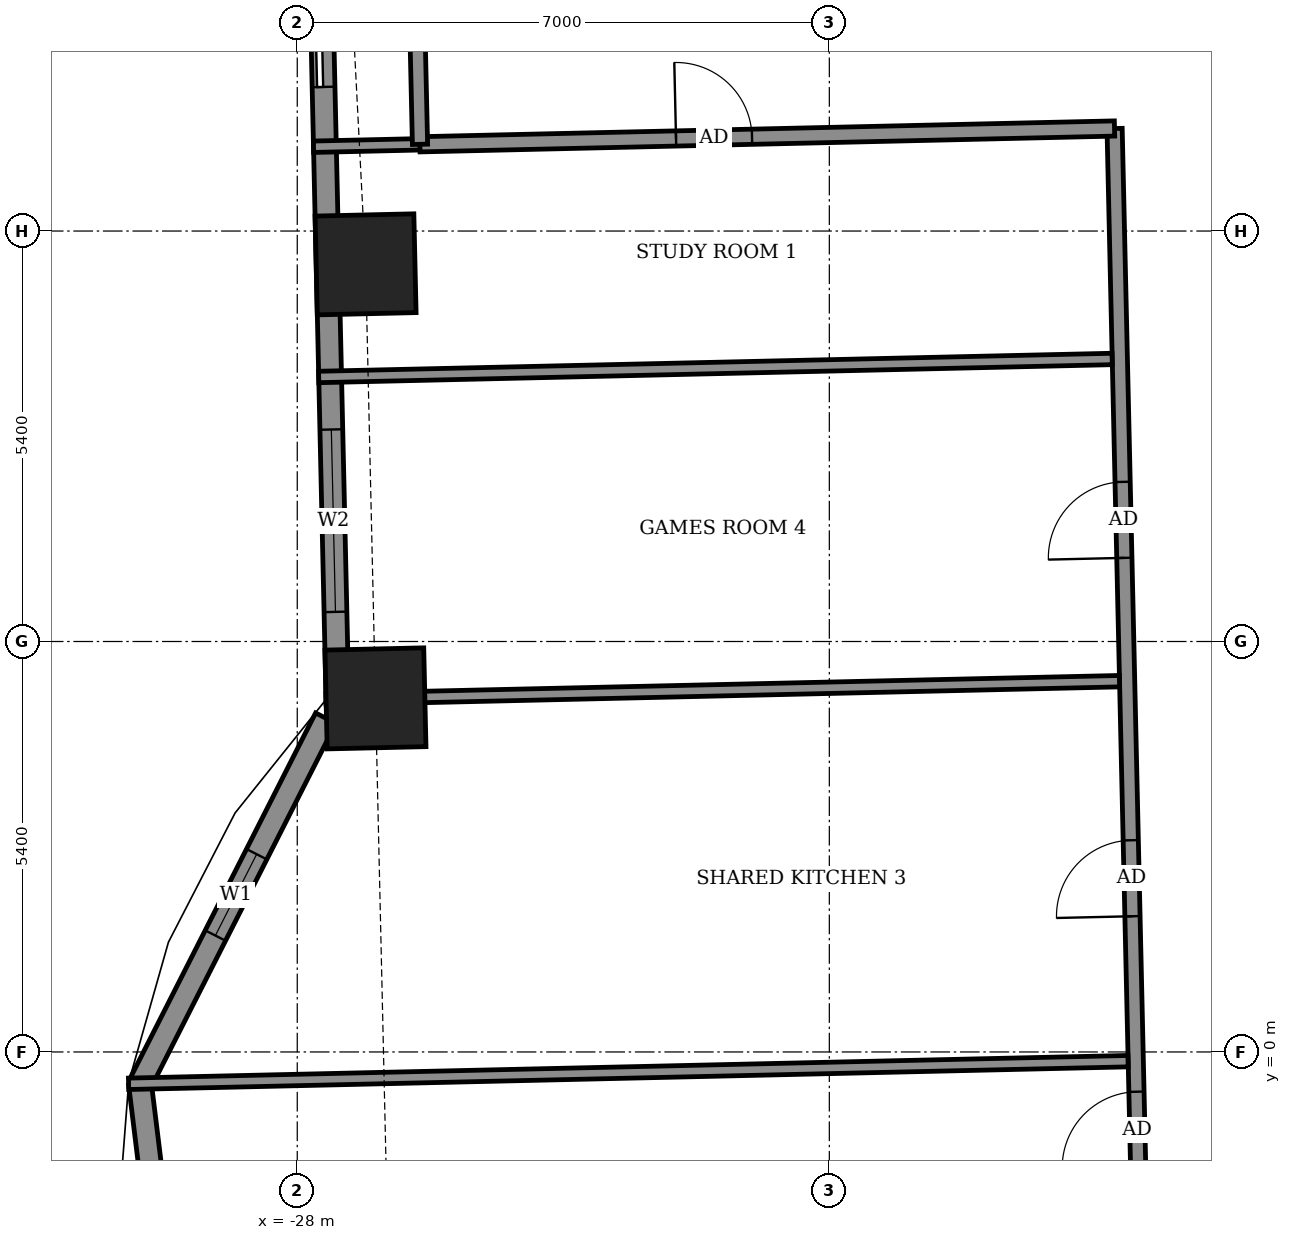
"""IFC4 building model, lengths in metres.
Left out: names, types, materials, properties, quantities, classifications, styles, units other than length and angle.
Written with IfcOpenShell. Run it as: python <this file> out.ifc"""

import sys

from ifc_helpers import new_model, si_unit, direction, frame, frame_2d, origin, origin_2d, place, context, subcontext, project, spatial, rectangle, extrude, element, fill, save


model = new_model("IFC4")
c1 = context("Model", 3, precision=1e-05, world=origin(), true_north=direction((0.0, 1.0)))
c2 = subcontext(c1, "Body", "Model", "MODEL_VIEW")
j1 = project(units=[si_unit("LENGTHUNIT", "METRE"), si_unit("PLANEANGLEUNIT", "RADIAN")], contexts=[c1])
p1 = place(None, origin())
s1 = spatial("IfcSite", under=j1, at=p1, CompositionType="ELEMENT")
p2 = place(p1, origin())
s2 = spatial("IfcBuilding", under=s1, at=p2, CompositionType="ELEMENT")
p3 = place(p2, frame((0.0, 0.0, 140.9)))
s3 = spatial("IfcBuildingStorey", under=s2, at=p3, CompositionType="ELEMENT", Elevation=140.9)
for number, where, z_axis, x_axis in (
    (1, (-27.101, 10.362, -0.55), (0.0, 0.0, 1.0), (0.023, -1.0, 0.0)),
    (2, (-26.971, 4.652, -0.55), (0.0, 0.0, 1.0), (0.023, -1.0, 0.0)),
):
    element("IfcColumn", number, at=place(p3, frame(where, z_axis=z_axis, x_axis=x_axis)), inside=s3, PredefinedType="COLUMN", context=c2, shape_type="SweptSolid", body=[
        extrude(rectangle(XDim=1.3, YDim=1.3, at=origin_2d()), origin(), (0.0, 0.0, 1.0), 3.6),
    ])
p4 = place(p3, frame((-27.727, 15.912, 0.0), z_axis=(0.0, 0.0, 1.0), x_axis=(0.022690078929, -0.999742547018, 0.0)))
e3 = element("IfcWall", 3, at=p4, inside=s3, PredefinedType="SOLIDWALL", context=c2, shape_type="SweptSolid", body=[
    extrude(rectangle(XDim=11.33, YDim=0.3, at=frame_2d((5.665, 0.0))), origin(), (0.0, 0.0, 1.0), 3.05),
])
p5 = place(p4, frame((1.717, 0.0, 0.0)))
e4 = element("IfcOpeningElement", 4, at=p5, cuts=e3, PredefinedType="OPENING", context=c2, shape_type="SweptSolid", body=[
    extrude(rectangle(XDim=1.5, YDim=2.4, at=frame_2d((0.75, 1.2))), frame((0.0, 0.16, 0.0), z_axis=(0.0, -1.0, 0.0), x_axis=(1.0, 0.0, 0.0)), (0.0, 0.0, 1.0), 0.32),
])
p6 = place(p4, frame((7.725, 0.0, 0.9)))
e5 = element("IfcOpeningElement", 5, at=p6, cuts=e3, PredefinedType="OPENING", context=c2, shape_type="SweptSolid", body=[
    extrude(rectangle(XDim=2.4, YDim=1.5, at=frame_2d((1.2, 0.75))), frame((0.0, 0.16, 0.0), z_axis=(0.0, -1.0, 0.0), x_axis=(1.0, 0.0, 0.0)), (0.0, 0.0, 1.0), 0.32),
])
p7 = place(p3, frame((-27.625, 4.392, 0.0), z_axis=(0.0, 0.0, 1.0), x_axis=(-0.45268572245, -0.891670138947, 0.0)))
e6 = element("IfcWall", 6, at=p7, inside=s3, PredefinedType="SOLIDWALL", context=c2, shape_type="SweptSolid", body=[
    extrude(rectangle(XDim=5.399, YDim=0.3, at=frame_2d((2.7, 0.0))), origin(), (0.0, 0.0, 1.0), 3.05),
])
p8 = place(p7, frame((2.008, 0.0, 0.9)))
e7 = element("IfcOpeningElement", 7, at=p8, cuts=e6, PredefinedType="OPENING", context=c2, shape_type="SweptSolid", body=[
    extrude(rectangle(XDim=1.2, YDim=1.5, at=frame_2d((0.6, 0.75))), frame((0.0, 0.16, 0.0), z_axis=(0.0, -1.0, 0.0), x_axis=(1.0, 0.0, 0.0)), (0.0, 0.0, 1.0), 0.32),
])
p9 = place(p3, frame((-30.069, -0.422, 0.0), z_axis=(0.0, 0.0, 1.0), x_axis=(0.122206978992, -0.992504636909, 0.0)))
e8 = element("IfcWall", 8, at=p9, inside=s3, PredefinedType="SOLIDWALL", context=c2, shape_type="SweptSolid", body=[
    extrude(rectangle(XDim=5.574, YDim=0.3, at=frame_2d((2.787, 0.0))), origin(), (0.0, 0.0, 1.0), 3.05),
])
p10 = place(p9, frame((2.187, 0.0, 0.9)))
e9 = element("IfcOpeningElement", 9, at=p10, cuts=e8, PredefinedType="OPENING", context=c2, shape_type="SweptSolid", body=[
    extrude(rectangle(XDim=1.2, YDim=1.5, at=frame_2d((0.6, 0.75))), frame((0.0, 0.16, 0.0), z_axis=(0.0, -1.0, 0.0), x_axis=(1.0, 0.0, 0.0)), (0.0, 0.0, 1.0), 0.32),
])
p11 = place(p3, frame((-30.307, 7.701, 0.0), z_axis=(0.0, 0.0, 1.0), x_axis=(-0.022706615587, 0.999742171567, 0.0)))
e10 = element("IfcWall", 10, at=p11, inside=s3, PredefinedType="USERDEFINED", context=c2, shape_type="SweptSolid", body=[
    extrude(rectangle(XDim=6.0, YDim=0.55, at=frame_2d((3.0, 0.0))), origin(), (0.0, 0.0, 1.0), 0.8),
])
p12 = place(p3, frame((-16.603, -16.218, 0.0), z_axis=(0.0, 0.0, 1.0), x_axis=(-0.022698146637, 0.999742363881, 0.0)))
e11 = element("IfcWall", 11, at=p12, inside=s3, PredefinedType="PARTITIONING", context=c2, shape_type="SweptSolid", body=[
    extrude(rectangle(XDim=28.374, YDim=0.2, at=frame_2d((14.187, 0.0))), origin(), (0.0, 0.0, 1.0), 3.05),
])
p13 = place(p12, frame((22.724, 0.0, 0.0)))
e12 = element("IfcOpeningElement", 12, at=p13, cuts=e11, PredefinedType="OPENING", context=c2, shape_type="SweptSolid", body=[
    extrude(rectangle(XDim=1.0, YDim=2.1, at=frame_2d((0.5, 1.05))), frame((0.0, 0.11, 0.0), z_axis=(0.0, -1.0, 0.0), x_axis=(1.0, 0.0, 0.0)), (0.0, 0.0, 1.0), 0.22),
])
p14 = place(p12, frame((18.008, 0.0, 0.0)))
e13 = element("IfcOpeningElement", 13, at=p14, cuts=e11, PredefinedType="OPENING", context=c2, shape_type="SweptSolid", body=[
    extrude(rectangle(XDim=1.0, YDim=2.1, at=frame_2d((0.5, 1.05))), frame((0.0, 0.11, 0.0), z_axis=(0.0, -1.0, 0.0), x_axis=(1.0, 0.0, 0.0)), (0.0, 0.0, 1.0), 0.22),
])
p15 = place(p12, frame((14.699, 0.0, 0.0)))
e14 = element("IfcOpeningElement", 14, at=p15, cuts=e11, PredefinedType="OPENING", context=c2, shape_type="SweptSolid", body=[
    extrude(rectangle(XDim=1.0, YDim=2.1, at=frame_2d((0.5, 1.05))), frame((0.0, 0.11, 0.0), z_axis=(0.0, -1.0, 0.0), x_axis=(1.0, 0.0, 0.0)), (0.0, 0.0, 1.0), 0.22),
])
p16 = place(p12, frame((12.549, 0.0, 0.0)))
e15 = element("IfcOpeningElement", 15, at=p16, cuts=e11, PredefinedType="OPENING", context=c2, shape_type="SweptSolid", body=[
    extrude(rectangle(XDim=0.9, YDim=2.1, at=frame_2d((0.45, 1.05))), frame((0.0, 0.11, 0.0), z_axis=(0.0, -1.0, 0.0), x_axis=(1.0, 0.0, 0.0)), (0.0, 0.0, 1.0), 0.22),
])
p17 = place(p12, frame((10.324, 0.0, 0.0)))
e16 = element("IfcOpeningElement", 16, at=p17, cuts=e11, PredefinedType="OPENING", context=c2, shape_type="SweptSolid", body=[
    extrude(rectangle(XDim=1.0, YDim=2.1, at=frame_2d((0.5, 1.05))), frame((0.0, 0.11, 0.0), z_axis=(0.0, -1.0, 0.0), x_axis=(1.0, 0.0, 0.0)), (0.0, 0.0, 1.0), 0.22),
])
p18 = place(p12, frame((8.199, 0.0, 0.0)))
e17 = element("IfcOpeningElement", 17, at=p18, cuts=e11, PredefinedType="OPENING", context=c2, shape_type="SweptSolid", body=[
    extrude(rectangle(XDim=0.9, YDim=2.1, at=frame_2d((0.45, 1.05))), frame((0.0, 0.11, 0.0), z_axis=(0.0, -1.0, 0.0), x_axis=(1.0, 0.0, 0.0)), (0.0, 0.0, 1.0), 0.22),
])
p19 = place(p12, frame((5.874, 0.0, 0.0)))
e18 = element("IfcOpeningElement", 18, at=p19, cuts=e11, PredefinedType="OPENING", context=c2, shape_type="SweptSolid", body=[
    extrude(rectangle(XDim=1.0, YDim=2.1, at=frame_2d((0.5, 1.05))), frame((0.0, 0.11, 0.0), z_axis=(0.0, -1.0, 0.0), x_axis=(1.0, 0.0, 0.0)), (0.0, 0.0, 1.0), 0.22),
])
p20 = place(p12, frame((3.75, 0.0, 0.0)))
e19 = element("IfcOpeningElement", 19, at=p20, cuts=e11, PredefinedType="OPENING", context=c2, shape_type="SweptSolid", body=[
    extrude(rectangle(XDim=0.9, YDim=2.1, at=frame_2d((0.45, 1.05))), frame((0.0, 0.11, 0.0), z_axis=(0.0, -1.0, 0.0), x_axis=(1.0, 0.0, 0.0)), (0.0, 0.0, 1.0), 0.22),
])
p21 = place(p3, frame((-30.219, -0.419, 0.0), z_axis=(0.0, 0.0, 1.0), x_axis=(0.99974353853, 0.022646349976, 0.0)))
e20 = element("IfcWall", 20, at=p21, inside=s3, PredefinedType="PARTITIONING", context=c2, shape_type="SweptSolid", body=[
    extrude(rectangle(XDim=13.152, YDim=0.15, at=frame_2d((6.576, 0.0))), origin(), (0.0, 0.0, 1.0), 2.1),
])
p22 = place(p3, frame((-27.621, 4.641, 0.0), z_axis=(0.0, 0.0, 1.0), x_axis=(0.999742728106, 0.022682098664, 0.0)))
e21 = element("IfcWall", 21, at=p22, inside=s3, PredefinedType="PARTITIONING", context=c2, shape_type="SweptSolid", body=[
    extrude(rectangle(XDim=10.441, YDim=0.15, at=frame_2d((5.22, 0.0))), origin(), (0.0, 0.0, 1.0), 3.05),
])
p23 = place(p3, frame((-27.718, 8.88, 0.0), z_axis=(0.0, 0.0, 1.0), x_axis=(0.999742245794, 0.022703347225, 0.0)))
e22 = element("IfcWall", 22, at=p23, inside=s3, PredefinedType="PARTITIONING", context=c2, shape_type="SweptSolid", body=[
    extrude(rectangle(XDim=10.442, YDim=0.15, at=frame_2d((5.221, 0.0))), origin(), (0.0, 0.0, 1.0), 2.55),
])
p24 = place(p3, frame((-27.786, 11.909, 0.0), z_axis=(0.0, 0.0, 1.0), x_axis=(0.999740216184, 0.022792545827, 0.0)))
e23 = element("IfcWall", 23, at=p24, inside=s3, PredefinedType="PARTITIONING", context=c2, shape_type="SweptSolid", body=[
    extrude(rectangle(XDim=1.403, YDim=0.15, at=frame_2d((0.702, 0.0))), origin(), (0.0, 0.0, 1.0), 2.55),
])
p25 = place(p3, frame((-26.387, 11.941, 0.0), z_axis=(0.0, 0.0, 1.0), x_axis=(0.999741076645, 0.022754772455, 0.0)))
e24 = element("IfcWall", 24, at=p25, inside=s3, PredefinedType="PARTITIONING", context=c2, shape_type="SweptSolid", body=[
    extrude(rectangle(XDim=9.141, YDim=0.2, at=frame_2d((4.571, 0.0))), origin(), (0.0, 0.0, 1.0), 3.05),
])
p26 = place(p25, frame((3.371, 0.0, 0.0)))
e25 = element("IfcOpeningElement", 25, at=p26, cuts=e24, PredefinedType="OPENING", context=c2, shape_type="SweptSolid", body=[
    extrude(rectangle(XDim=1.0, YDim=2.1, at=frame_2d((0.5, 1.05))), frame((0.0, 0.11, 0.0), z_axis=(0.0, -1.0, 0.0), x_axis=(1.0, 0.0, 0.0)), (0.0, 0.0, 1.0), 0.22),
])
p27 = place(p3, frame((-26.385, 11.941, 0.0), z_axis=(0.0, 0.0, 1.0), x_axis=(-0.022617910375, 0.999744182344, 0.0)))
e26 = element("IfcWall", 26, at=p27, inside=s3, PredefinedType="PARTITIONING", context=c2, shape_type="SweptSolid", body=[
    extrude(rectangle(XDim=1.5, YDim=0.2, at=frame_2d((0.75, 0.0))), origin(), (0.0, 0.0, 1.0), 3.05),
])
p28 = place(p5, origin())
e27 = element("IfcDoor", 27, at=p28, inside=s3, OperationType="SLIDING_TO_LEFT", PredefinedType="DOOR", context=c2, shape_type="SweptSolid", body=[
    extrude(rectangle(XDim=1.5, YDim=2.4, at=frame_2d((0.75, 1.2))), frame((0.0, 0.025, 0.0), z_axis=(0.0, -1.0, 0.0), x_axis=(1.0, 0.0, 0.0)), (0.0, 0.0, 1.0), 0.05),
])
fill(e4, e27)
p29 = place(p6, origin())
e28 = element("IfcWindow", 28, at=p29, inside=s3, PartitioningType="DOUBLE_PANEL_VERTICAL", PredefinedType="WINDOW", context=c2, shape_type="SweptSolid", body=[
    extrude(rectangle(XDim=2.4, YDim=1.5, at=frame_2d((1.2, 0.75))), frame((0.0, 0.03, 0.0), z_axis=(0.0, -1.0, 0.0), x_axis=(1.0, 0.0, 0.0)), (0.0, 0.0, 1.0), 0.06),
])
fill(e5, e28)
p30 = place(p8, origin())
e29 = element("IfcWindow", 29, at=p30, inside=s3, PartitioningType="SINGLE_PANEL", PredefinedType="WINDOW", context=c2, shape_type="SweptSolid", body=[
    extrude(rectangle(XDim=1.2, YDim=1.5, at=frame_2d((0.6, 0.75))), frame((0.0, 0.03, 0.0), z_axis=(0.0, -1.0, 0.0), x_axis=(1.0, 0.0, 0.0)), (0.0, 0.0, 1.0), 0.06),
])
fill(e7, e29)
p31 = place(p26, origin())
e30 = element("IfcDoor", 30, at=p31, inside=s3, OperationType="SINGLE_SWING_RIGHT", PredefinedType="DOOR", context=c2, shape_type="SweptSolid", body=[
    extrude(rectangle(XDim=1.0, YDim=2.1, at=frame_2d((0.5, 1.05))), frame((0.0, 0.025, 0.0), z_axis=(0.0, -1.0, 0.0), x_axis=(1.0, 0.0, 0.0)), (0.0, 0.0, 1.0), 0.05),
])
fill(e25, e30)
p32 = place(p13, origin())
e31 = element("IfcDoor", 31, at=p32, inside=s3, OperationType="SINGLE_SWING_LEFT", PredefinedType="DOOR", context=c2, shape_type="SweptSolid", body=[
    extrude(rectangle(XDim=1.0, YDim=2.1, at=frame_2d((0.5, 1.05))), frame((0.0, 0.025, 0.0), z_axis=(0.0, -1.0, 0.0), x_axis=(1.0, 0.0, 0.0)), (0.0, 0.0, 1.0), 0.05),
])
fill(e12, e31)
p33 = place(p14, origin())
e32 = element("IfcDoor", 32, at=p33, inside=s3, OperationType="SINGLE_SWING_RIGHT", PredefinedType="DOOR", context=c2, shape_type="SweptSolid", body=[
    extrude(rectangle(XDim=1.0, YDim=2.1, at=frame_2d((0.5, 1.05))), frame((0.0, 0.025, 0.0), z_axis=(0.0, -1.0, 0.0), x_axis=(1.0, 0.0, 0.0)), (0.0, 0.0, 1.0), 0.05),
])
fill(e13, e32)
p34 = place(p15, origin())
e33 = element("IfcDoor", 33, at=p34, inside=s3, OperationType="SINGLE_SWING_LEFT", PredefinedType="DOOR", context=c2, shape_type="SweptSolid", body=[
    extrude(rectangle(XDim=1.0, YDim=2.1, at=frame_2d((0.5, 1.05))), frame((0.0, 0.025, 0.0), z_axis=(0.0, -1.0, 0.0), x_axis=(1.0, 0.0, 0.0)), (0.0, 0.0, 1.0), 0.05),
])
fill(e14, e33)
save(model, sys.argv[1])
